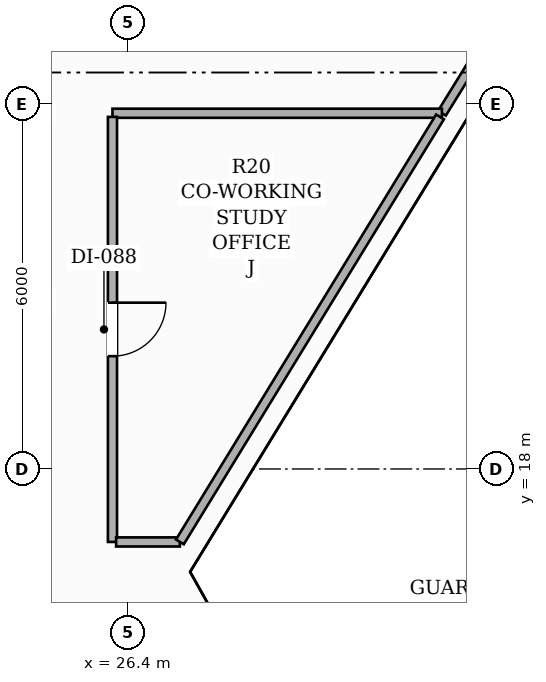
"""IFC4 building model, lengths in metres.
Left out: names, types, materials, properties, quantities, classifications, styles, units other than length and angle.
Written with IfcOpenShell. Run it as: python <this file> out.ifc"""

import sys

from ifc_helpers import new_model, si_unit, direction, frame, frame_2d, origin, place, context, subcontext, project, spatial, rectangle, extrude, element, fill, save


model = new_model("IFC4")
c1 = context("Model", 3, precision=1e-05, world=origin(), true_north=direction((0.0, 1.0)))
c2 = subcontext(c1, "Body", "Model", "MODEL_VIEW")
j1 = project(units=[si_unit("LENGTHUNIT", "METRE"), si_unit("PLANEANGLEUNIT", "RADIAN")], contexts=[c1])
p1 = place(None, origin())
s1 = spatial("IfcSite", under=j1, at=p1, CompositionType="ELEMENT")
p2 = place(p1, origin())
s2 = spatial("IfcBuilding", under=s1, at=p2, CompositionType="ELEMENT")
p3 = place(p2, frame((0.0, 0.0, 46.7)))
s3 = spatial("IfcBuildingStorey", under=s2, at=p3, CompositionType="ELEMENT", Elevation=46.7)
p4 = place(p3, frame((32.129, 24.758, 0.0), z_axis=(0.0, 0.0, 1.0), x_axis=(-0.525488010188, -0.850801005611, 0.0)))
e1 = element("IfcWall", 1, at=p4, inside=s3, PredefinedType="PARTITIONING", context=c2, shape_type="SweptSolid", body=[
    extrude(rectangle(XDim=1.067, YDim=0.15, at=frame_2d((0.534, 0.0))), origin(), (0.0, 0.0, 1.0), 3.06),
])
p5 = place(p3, frame((31.568, 23.85, 0.0), z_axis=(0.0, 0.0, 1.0), x_axis=(-1.0, 0.0, 0.0)))
e2 = element("IfcWall", 2, at=p5, inside=s3, PredefinedType="PARTITIONING", context=c2, shape_type="SweptSolid", body=[
    extrude(rectangle(XDim=5.418, YDim=0.15, at=frame_2d((2.709, 0.0))), origin(), (0.0, 0.0, 1.0), 2.669),
])
p6 = place(p3, frame((26.15, 23.79, 0.0), z_axis=(0.0, 0.0, 1.0), x_axis=(0.0, -1.0, 0.0)))
e3 = element("IfcWall", 3, at=p6, inside=s3, PredefinedType="PARTITIONING", context=c2, shape_type="SweptSolid", body=[
    extrude(rectangle(XDim=6.99, YDim=0.15, at=frame_2d((3.495, 0.0))), origin(), (0.0, 0.0, 1.0), 2.669),
])
p7 = place(p6, frame((3.055, 0.0, 0.0)))
e4 = element("IfcOpeningElement", 4, at=p7, cuts=e3, PredefinedType="OPENING", context=c2, shape_type="SweptSolid", body=[
    extrude(rectangle(XDim=0.88, YDim=2.1, at=frame_2d((0.44, 1.05))), frame((0.0, 0.085, 0.0), z_axis=(0.0, -1.0, 0.0), x_axis=(1.0, 0.0, 0.0)), (0.0, 0.0, 1.0), 0.17),
])
p8 = place(p3, frame((26.21, 16.8, 0.0), z_axis=(0.0, 0.0, 1.0), x_axis=(1.0, 0.0, 0.0)))
e5 = element("IfcWall", 5, at=p8, inside=s3, PredefinedType="PARTITIONING", context=c2, shape_type="SweptSolid", body=[
    extrude(rectangle(XDim=1.049, YDim=0.15, at=frame_2d((0.524, 0.0))), origin(), (0.0, 0.0, 1.0), 3.06),
])
p9 = place(p3, frame((27.259, 16.801, 0.0), z_axis=(0.0, 0.0, 1.0), x_axis=(0.522072924527, 0.852900850906, 0.0)))
e6 = element("IfcWall", 6, at=p9, inside=s3, PredefinedType="PARTITIONING", context=c2, shape_type="SweptSolid", body=[
    extrude(rectangle(XDim=8.194, YDim=0.15, at=frame_2d((4.097, 0.0))), origin(), (0.0, 0.0, 1.0), 2.669),
])
p10 = place(p7, origin())
e7 = element("IfcDoor", 7, at=p10, inside=s3, OperationType="SINGLE_SWING_LEFT", PredefinedType="DOOR", context=c2, shape_type="SweptSolid", body=[
    extrude(rectangle(XDim=0.88, YDim=2.1, at=frame_2d((0.44, 1.05))), frame((0.0, 0.025, 0.0), z_axis=(0.0, -1.0, 0.0), x_axis=(1.0, 0.0, 0.0)), (0.0, 0.0, 1.0), 0.05),
])
fill(e4, e7)
save(model, sys.argv[1])
